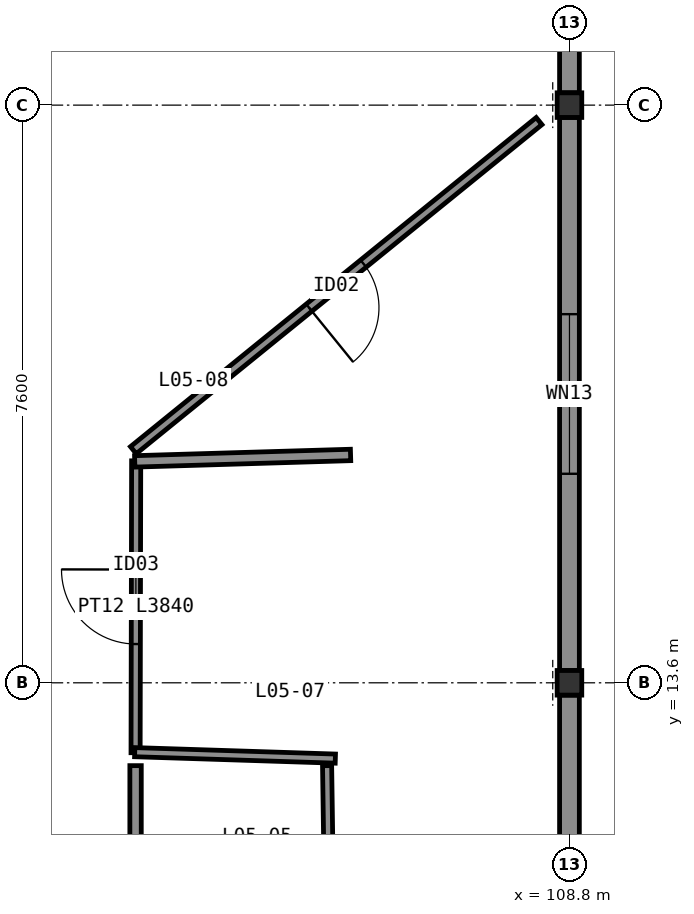
"""IFC4 building model, lengths in metres.
Left out: names, types, materials, properties, quantities, classifications, styles, units other than length and angle.
Written with IfcOpenShell. Run it as: python <this file> out.ifc"""

import sys

from ifc_helpers import new_model, si_unit, direction, frame, frame_2d, origin, origin_2d, place, context, subcontext, project, spatial, rectangle, hollow_circle, extrude, element, fill, save


model = new_model("IFC4")
c1 = context("Model", 3, precision=1e-05, world=origin(), true_north=direction((0.0, 1.0)))
c2 = subcontext(c1, "Body", "Model", "MODEL_VIEW")
j1 = project(units=[si_unit("LENGTHUNIT", "METRE"), si_unit("PLANEANGLEUNIT", "RADIAN")], contexts=[c1])
p1 = place(None, origin())
s1 = spatial("IfcSite", under=j1, at=p1, CompositionType="ELEMENT")
p2 = place(p1, origin())
s2 = spatial("IfcBuilding", under=s1, at=p2, CompositionType="ELEMENT")
p3 = place(p2, frame((0.0, 0.0, 22.2)))
s3 = spatial("IfcBuildingStorey", under=s2, at=p3, CompositionType="ELEMENT", Elevation=22.2)
for number, where, z_axis, x_axis in (
    (1, (108.8, 13.6, 0.0), (0.0, 0.0, 1.0), (1.0, 0.0, 0.0)),
    (2, (108.8, 21.2, 0.0), (0.0, 0.0, 1.0), (1.0, 0.0, 0.0)),
):
    element("IfcColumn", number, at=place(p3, frame(where, z_axis=z_axis, x_axis=x_axis)), inside=s3, PredefinedType="COLUMN", context=c2, shape_type="SweptSolid", body=[
        extrude(hollow_circle(Radius=0.162, WallThickness=0.016, at=origin_2d()), origin(), (0.0, 0.0, 1.0), 4.2),
    ])
p4 = place(p3, frame((108.8, 6.162, 0.0), z_axis=(0.0, 0.0, 1.0), x_axis=(0.0, 1.0, 0.0)))
e3 = element("IfcWall", 3, at=p4, inside=s3, PredefinedType="SOLIDWALL", context=c2, shape_type="SweptSolid", body=[
    extrude(rectangle(XDim=7.276, YDim=0.26, at=frame_2d((3.638, 0.0))), origin(), (0.0, 0.0, 1.0), 3.315),
])
p5 = place(p4, frame((2.738, 0.0, 0.95)))
e4 = element("IfcOpeningElement", 4, at=p5, cuts=e3, PredefinedType="OPENING", context=c2, shape_type="SweptSolid", body=[
    extrude(rectangle(XDim=1.8, YDim=1.8, at=frame_2d((0.9, 0.9))), frame((0.0, 0.14, 0.0), z_axis=(0.0, -1.0, 0.0), x_axis=(1.0, 0.0, 0.0)), (0.0, 0.0, 1.0), 0.28),
])
p6 = place(p3, frame((108.8, 13.762, 0.0), z_axis=(0.0, 0.0, 1.0), x_axis=(0.0, 1.0, 0.0)))
e5 = element("IfcWall", 5, at=p6, inside=s3, PredefinedType="SOLIDWALL", context=c2, shape_type="SweptSolid", body=[
    extrude(rectangle(XDim=7.276, YDim=0.26, at=frame_2d((3.638, 0.0))), origin(), (0.0, 0.0, 1.0), 3.315),
])
p7 = place(p6, frame((2.588, 0.0, 0.95)))
e6 = element("IfcOpeningElement", 6, at=p7, cuts=e5, PredefinedType="OPENING", context=c2, shape_type="SweptSolid", body=[
    extrude(rectangle(XDim=2.1, YDim=1.8, at=frame_2d((1.05, 0.9))), frame((0.0, 0.14, 0.0), z_axis=(0.0, -1.0, 0.0), x_axis=(1.0, 0.0, 0.0)), (0.0, 0.0, 1.0), 0.28),
])
p8 = place(p3, frame((108.8, 21.362, 0.0), z_axis=(0.0, 0.0, 1.0), x_axis=(0.0, 1.0, 0.0)))
e7 = element("IfcWall", 7, at=p8, inside=s3, PredefinedType="SOLIDWALL", context=c2, shape_type="SweptSolid", body=[
    extrude(rectangle(XDim=7.276, YDim=0.26, at=frame_2d((3.638, 0.0))), origin(), (0.0, 0.0, 1.0), 3.315),
])
p9 = place(p8, frame((2.438, 0.0, 0.95)))
e8 = element("IfcOpeningElement", 8, at=p9, cuts=e7, PredefinedType="OPENING", context=c2, shape_type="SweptSolid", body=[
    extrude(rectangle(XDim=2.4, YDim=1.8, at=frame_2d((1.2, 0.9))), frame((0.0, 0.14, 0.0), z_axis=(0.0, -1.0, 0.0), x_axis=(1.0, 0.0, 0.0)), (0.0, 0.0, 1.0), 0.28),
])
p10 = place(p3, frame((103.091, 12.68, 0.0), z_axis=(0.0, 0.0, 1.0), x_axis=(0.002098030858, 0.999997799131, 0.0)))
e9 = element("IfcWall", 9, at=p10, inside=s3, PredefinedType="PARTITIONING", context=c2, shape_type="SweptSolid", body=[
    extrude(rectangle(XDim=3.84, YDim=0.12, at=frame_2d((1.92, 0.0))), origin(), (0.0, 0.0, 1.0), 3.95),
])
p11 = place(p10, frame((1.43, 0.0, 0.0)))
e10 = element("IfcOpeningElement", 10, at=p11, cuts=e9, PredefinedType="OPENING", context=c2, shape_type="SweptSolid", body=[
    extrude(rectangle(XDim=0.98, YDim=2.08, at=frame_2d((0.49, 1.04))), frame((0.0, 0.07, 0.0), z_axis=(0.0, -1.0, 0.0), x_axis=(1.0, 0.0, 0.0)), (0.0, 0.0, 1.0), 0.14),
])
p12 = place(p3, frame((103.09, 6.4, 0.0), z_axis=(0.0, 0.0, 1.0), x_axis=(0.000199784229, 0.999999980043, 0.0)))
e11 = element("IfcWall", 11, at=p12, inside=s3, PredefinedType="PARTITIONING", context=c2, shape_type="SweptSolid", body=[
    extrude(rectangle(XDim=6.11, YDim=0.15, at=frame_2d((3.055, 0.0))), origin(), (0.0, 0.0, 1.0), 3.95),
])
p13 = place(p12, frame((2.615, 0.0, 0.0)))
e12 = element("IfcOpeningElement", 12, at=p13, cuts=e11, PredefinedType="OPENING", context=c2, shape_type="SweptSolid", body=[
    extrude(rectangle(XDim=0.88, YDim=2.08, at=frame_2d((0.44, 1.04))), frame((0.0, 0.085, 0.0), z_axis=(0.0, -1.0, 0.0), x_axis=(1.0, 0.0, 0.0)), (0.0, 0.0, 1.0), 0.17),
])
p14 = place(p3, frame((108.4, 20.99, 0.0), z_axis=(0.0, 0.0, 1.0), x_axis=(-0.776643958555, -0.62993980795, 0.0)))
e13 = element("IfcWall", 13, at=p14, inside=s3, PredefinedType="PARTITIONING", context=c2, shape_type="SweptSolid", body=[
    extrude(rectangle(XDim=6.873, YDim=0.12, at=frame_2d((3.437, 0.0))), origin(), (0.0, 0.0, 1.0), 3.95),
])
p15 = place(p14, frame((2.977, 0.0, 0.0)))
e14 = element("IfcOpeningElement", 14, at=p15, cuts=e13, PredefinedType="OPENING", context=c2, shape_type="SweptSolid", body=[
    extrude(rectangle(XDim=0.92, YDim=2.08, at=frame_2d((0.46, 1.04))), frame((0.0, 0.07, 0.0), z_axis=(0.0, -1.0, 0.0), x_axis=(1.0, 0.0, 0.0)), (0.0, 0.0, 1.0), 0.14),
])
p16 = place(p3, frame((105.719, 12.603, 0.0), z_axis=(0.0, 0.0, 1.0), x_axis=(-0.999482322346, 0.032172772933, 0.0)))
e15 = element("IfcWall", 15, at=p16, inside=s3, PredefinedType="PARTITIONING", context=c2, shape_type="SweptSolid", body=[
    extrude(rectangle(XDim=2.641, YDim=0.12, at=frame_2d((1.32, 0.0))), origin(), (0.0, 0.0, 1.0), 3.95),
])
p17 = place(p3, frame((103.08, 16.513, 0.0), z_axis=(0.0, 0.0, 1.0), x_axis=(0.999555337587, 0.029818234366, 0.0)))
e16 = element("IfcWall", 16, at=p17, inside=s3, PredefinedType="PARTITIONING", context=c2, shape_type="SweptSolid", body=[
    extrude(rectangle(XDim=2.841, YDim=0.15, at=frame_2d((1.42, 0.0))), origin(), (0.0, 0.0, 1.0), 3.95),
])
p18 = place(p3, frame((105.611, 12.51, 0.0), z_axis=(0.0, 0.0, 1.0), x_axis=(0.014542754085, -0.99989424856, 0.0)))
e17 = element("IfcWall", 17, at=p18, inside=s3, PredefinedType="PARTITIONING", context=c2, shape_type="SweptSolid", body=[
    extrude(rectangle(XDim=6.111, YDim=0.12, at=frame_2d((3.055, 0.0))), origin(), (0.0, 0.0, 1.0), 3.95),
])
p19 = place(p18, frame((2.515, 0.0, 0.0)))
e18 = element("IfcOpeningElement", 18, at=p19, cuts=e17, PredefinedType="OPENING", context=c2, shape_type="SweptSolid", body=[
    extrude(rectangle(XDim=1.08, YDim=2.12, at=frame_2d((0.54, 1.06))), frame((0.0, 0.07, 0.0), z_axis=(0.0, -1.0, 0.0), x_axis=(1.0, 0.0, 0.0)), (0.0, 0.0, 1.0), 0.14),
])
p20 = place(p7, origin())
e19 = element("IfcWindow", 19, at=p20, inside=s3, PartitioningType="DOUBLE_PANEL_VERTICAL", PredefinedType="WINDOW", context=c2, shape_type="SweptSolid", body=[
    extrude(rectangle(XDim=2.1, YDim=1.8, at=frame_2d((1.05, 0.9))), frame((0.0, 0.03, 0.0), z_axis=(0.0, -1.0, 0.0), x_axis=(1.0, 0.0, 0.0)), (0.0, 0.0, 1.0), 0.06),
])
fill(e6, e19)
p21 = place(p11, origin())
e20 = element("IfcDoor", 20, at=p21, inside=s3, OperationType="SINGLE_SWING_RIGHT", PredefinedType="DOOR", context=c2, shape_type="SweptSolid", body=[
    extrude(rectangle(XDim=0.98, YDim=2.08, at=frame_2d((0.49, 1.04))), frame((0.0, 0.025, 0.0), z_axis=(0.0, -1.0, 0.0), x_axis=(1.0, 0.0, 0.0)), (0.0, 0.0, 1.0), 0.05),
])
fill(e10, e20)
p22 = place(p15, origin())
e21 = element("IfcDoor", 21, at=p22, inside=s3, OperationType="SINGLE_SWING_RIGHT", PredefinedType="DOOR", context=c2, shape_type="SweptSolid", body=[
    extrude(rectangle(XDim=0.92, YDim=2.08, at=frame_2d((0.46, 1.04))), frame((0.0, 0.025, 0.0), z_axis=(0.0, -1.0, 0.0), x_axis=(1.0, 0.0, 0.0)), (0.0, 0.0, 1.0), 0.05),
])
fill(e14, e21)
save(model, sys.argv[1])
